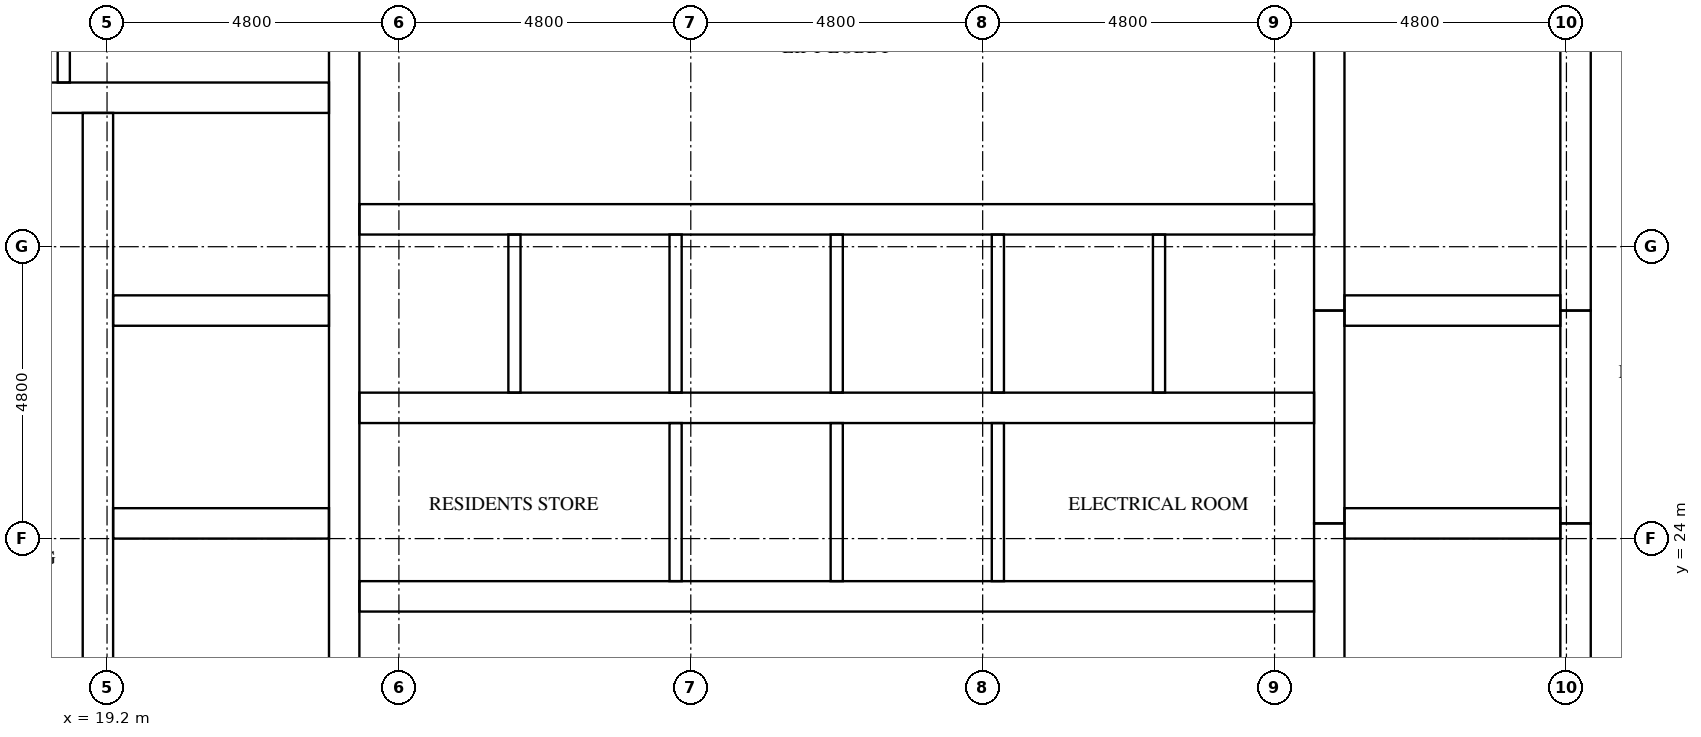
"""IFC4 building model, lengths in metres.
Left out: names, types, materials, properties, quantities, classifications, styles, units other than length and angle.
Written with IfcOpenShell. Run it as: python <this file> out.ifc"""

import sys

from ifc_helpers import new_model, si_unit, direction, frame, frame_2d, origin, place, context, subcontext, project, spatial, rectangle, extrude, element, fill, save


model = new_model("IFC4")
c1 = context("Model", 3, precision=1e-05, world=origin(), true_north=direction((0.0, 1.0)))
c2 = subcontext(c1, "Body", "Model", "MODEL_VIEW")
j1 = project(units=[si_unit("LENGTHUNIT", "METRE"), si_unit("PLANEANGLEUNIT", "RADIAN")], contexts=[c1])
p1 = place(None, origin())
s1 = spatial("IfcSite", under=j1, at=p1, CompositionType="ELEMENT")
p2 = place(p1, origin())
s2 = spatial("IfcBuilding", under=s1, at=p2, CompositionType="ELEMENT")
p3 = place(p2, frame((0.0, 0.0, 185.9)))
s3 = spatial("IfcBuildingStorey", under=s2, at=p3, CompositionType="ELEMENT", Elevation=185.9)
p4 = place(p3, frame((19.05, 15.7, 0.0), z_axis=(0.0, 0.0, 1.0), x_axis=(0.0, 1.0, 0.0)))
e1 = element("IfcWall", 1, at=p4, inside=s3, PredefinedType="SHEAR", context=c2, shape_type="SweptSolid", body=[
    extrude(rectangle(XDim=15.3, YDim=0.5, at=frame_2d((7.65, 0.0))), origin(), (0.0, 0.0, 1.0), 3.2),
])
p5 = place(p4, frame((9.75, 0.0, 0.0)))
e2 = element("IfcOpeningElement", 2, at=p5, cuts=e1, PredefinedType="OPENING", context=c2, shape_type="SweptSolid", body=[
    extrude(rectangle(XDim=1.1, YDim=2.1, at=frame_2d((0.55, 1.05))), frame((0.0, 0.26, 0.0), z_axis=(0.0, -1.0, 0.0), x_axis=(1.0, 0.0, 0.0)), (0.0, 0.0, 1.0), 0.52),
])
p6 = place(p4, frame((13.25, 0.0, 0.0)))
e3 = element("IfcOpeningElement", 3, at=p6, cuts=e1, PredefinedType="OPENING", context=c2, shape_type="SweptSolid", body=[
    extrude(rectangle(XDim=1.1, YDim=2.1, at=frame_2d((0.55, 1.05))), frame((0.0, 0.26, 0.0), z_axis=(0.0, -1.0, 0.0), x_axis=(1.0, 0.0, 0.0)), (0.0, 0.0, 1.0), 0.52),
])
p7 = place(p4, frame((0.5, 0.0, 0.0)))
e4 = element("IfcOpeningElement", 4, at=p7, cuts=e1, PredefinedType="OPENING", context=c2, shape_type="SweptSolid", body=[
    extrude(rectangle(XDim=1.2, YDim=2.1, at=frame_2d((0.6, 1.05))), frame((0.0, 0.26, 0.0), z_axis=(0.0, -1.0, 0.0), x_axis=(1.0, 0.0, 0.0)), (0.0, 0.0, 1.0), 0.52),
])
p8 = place(p3, frame((23.1, 15.7, 0.0), z_axis=(0.0, 0.0, 1.0), x_axis=(0.0, 1.0, 0.0)))
e5 = element("IfcWall", 5, at=p8, inside=s3, PredefinedType="SHEAR", context=c2, shape_type="SweptSolid", body=[
    extrude(rectangle(XDim=21.4, YDim=0.5, at=frame_2d((10.7, 0.0))), origin(), (0.0, 0.0, 1.0), 3.2),
])
p9 = place(p3, frame((39.3, 15.7, 0.0), z_axis=(0.0, 0.0, 1.0), x_axis=(0.0, 1.0, 0.0)))
e6 = element("IfcWall", 6, at=p9, inside=s3, PredefinedType="SHEAR", context=c2, shape_type="SweptSolid", body=[
    extrude(rectangle(XDim=8.55, YDim=0.5, at=frame_2d((4.275, 0.0))), origin(), (0.0, 0.0, 1.0), 3.2),
])
p10 = place(p3, frame((39.3, 24.25, 0.0), z_axis=(0.0, 0.0, 1.0), x_axis=(0.0, 1.0, 0.0)))
e7 = element("IfcWall", 7, at=p10, inside=s3, PredefinedType="SHEAR", context=c2, shape_type="SweptSolid", body=[
    extrude(rectangle(XDim=3.5, YDim=0.5, at=frame_2d((1.75, 0.0))), origin(), (0.0, 0.0, 1.0), 3.2),
])
p11 = place(p3, frame((39.3, 27.75, 0.0), z_axis=(0.0, 0.0, 1.0), x_axis=(0.0, 1.0, 0.0)))
e8 = element("IfcWall", 8, at=p11, inside=s3, PredefinedType="SHEAR", context=c2, shape_type="SweptSolid", body=[
    extrude(rectangle(XDim=9.35, YDim=0.5, at=frame_2d((4.675, 0.0))), origin(), (0.0, 0.0, 1.0), 3.2),
])
p12 = place(p3, frame((43.35, 15.7, 0.0), z_axis=(0.0, 0.0, 1.0), x_axis=(0.0, 1.0, 0.0)))
e9 = element("IfcWall", 9, at=p12, inside=s3, PredefinedType="SHEAR", context=c2, shape_type="SweptSolid", body=[
    extrude(rectangle(XDim=8.55, YDim=0.5, at=frame_2d((4.275, 0.0))), origin(), (0.0, 0.0, 1.0), 3.2),
])
p13 = place(p12, frame((0.5, 0.0, 0.0)))
e10 = element("IfcOpeningElement", 10, at=p13, cuts=e9, PredefinedType="OPENING", context=c2, shape_type="SweptSolid", body=[
    extrude(rectangle(XDim=1.2, YDim=2.1, at=frame_2d((0.6, 1.05))), frame((0.0, 0.26, 0.0), z_axis=(0.0, -1.0, 0.0), x_axis=(1.0, 0.0, 0.0)), (0.0, 0.0, 1.0), 0.52),
])
p14 = place(p3, frame((43.35, 24.25, 0.0), z_axis=(0.0, 0.0, 1.0), x_axis=(0.0, 1.0, 0.0)))
e11 = element("IfcWall", 11, at=p14, inside=s3, PredefinedType="SHEAR", context=c2, shape_type="SweptSolid", body=[
    extrude(rectangle(XDim=3.5, YDim=0.5, at=frame_2d((1.75, 0.0))), origin(), (0.0, 0.0, 1.0), 3.2),
])
p15 = place(p14, frame((1.2, 0.0, 0.0)))
e12 = element("IfcOpeningElement", 12, at=p15, cuts=e11, PredefinedType="OPENING", context=c2, shape_type="SweptSolid", body=[
    extrude(rectangle(XDim=1.1, YDim=2.1, at=frame_2d((0.55, 1.05))), frame((0.0, 0.26, 0.0), z_axis=(0.0, -1.0, 0.0), x_axis=(1.0, 0.0, 0.0)), (0.0, 0.0, 1.0), 0.52),
])
p16 = place(p3, frame((43.35, 27.75, 0.0), z_axis=(0.0, 0.0, 1.0), x_axis=(0.0, 1.0, 0.0)))
e13 = element("IfcWall", 13, at=p16, inside=s3, PredefinedType="SHEAR", context=c2, shape_type="SweptSolid", body=[
    extrude(rectangle(XDim=9.35, YDim=0.5, at=frame_2d((4.675, 0.0))), origin(), (0.0, 0.0, 1.0), 3.2),
])
p17 = place(p16, frame((7.65, 0.0, 0.0)))
e14 = element("IfcOpeningElement", 14, at=p17, cuts=e13, PredefinedType="OPENING", context=c2, shape_type="SweptSolid", body=[
    extrude(rectangle(XDim=1.2, YDim=2.1, at=frame_2d((0.6, 1.05))), frame((0.0, 0.26, 0.0), z_axis=(0.0, -1.0, 0.0), x_axis=(1.0, 0.0, 0.0)), (0.0, 0.0, 1.0), 0.52),
])
for number, where, z_axis, x_axis in (
    (15, (19.3, 24.25, 0.0), (0.0, 0.0, 1.0), (1.0, 0.0, 0.0)),
    (16, (19.3, 27.75, 0.0), (0.0, 0.0, 1.0), (1.0, 0.0, 0.0)),
):
    element("IfcWall", number, at=place(p3, frame(where, z_axis=z_axis, x_axis=x_axis)), inside=s3, PredefinedType="SHEAR", context=c2, shape_type="SweptSolid", body=[
        extrude(rectangle(XDim=3.55, YDim=0.5, at=frame_2d((1.775, 0.0))), origin(), (0.0, 0.0, 1.0), 3.2),
    ])
p18 = place(p3, frame((15.7, 31.25, 0.0), z_axis=(0.0, 0.0, 1.0), x_axis=(1.0, 0.0, 0.0)))
e17 = element("IfcWall", 17, at=p18, inside=s3, PredefinedType="SHEAR", context=c2, shape_type="SweptSolid", body=[
    extrude(rectangle(XDim=7.15, YDim=0.5, at=frame_2d((3.575, 0.0))), origin(), (0.0, 0.0, 1.0), 3.2),
])
for number, where, z_axis, x_axis in (
    (18, (39.55, 24.25, 0.0), (0.0, 0.0, 1.0), (1.0, 0.0, 0.0)),
    (19, (39.55, 27.75, 0.0), (0.0, 0.0, 1.0), (1.0, 0.0, 0.0)),
):
    element("IfcWall", number, at=place(p3, frame(where, z_axis=z_axis, x_axis=x_axis)), inside=s3, PredefinedType="SHEAR", context=c2, shape_type="SweptSolid", body=[
        extrude(rectangle(XDim=3.55, YDim=0.5, at=frame_2d((1.775, 0.0))), origin(), (0.0, 0.0, 1.0), 3.2),
    ])
p19 = place(p3, frame((23.35, 23.05, 0.0), z_axis=(0.0, 0.0, 1.0), x_axis=(1.0, 0.0, 0.0)))
e20 = element("IfcWall", 20, at=p19, inside=s3, PredefinedType="SHEAR", context=c2, shape_type="SweptSolid", body=[
    extrude(rectangle(XDim=15.7, YDim=0.5, at=frame_2d((7.85, 0.0))), origin(), (0.0, 0.0, 1.0), 3.2),
])
p20 = place(p19, frame((2.05, 0.0, 0.0)))
e21 = element("IfcOpeningElement", 21, at=p20, cuts=e20, PredefinedType="OPENING", context=c2, shape_type="SweptSolid", body=[
    extrude(rectangle(XDim=1.0, YDim=2.1, at=frame_2d((0.5, 1.05))), frame((0.0, 0.26, 0.0), z_axis=(0.0, -1.0, 0.0), x_axis=(1.0, 0.0, 0.0)), (0.0, 0.0, 1.0), 0.52),
])
p21 = place(p19, frame((12.65, 0.0, 0.0)))
e22 = element("IfcOpeningElement", 22, at=p21, cuts=e20, PredefinedType="OPENING", context=c2, shape_type="SweptSolid", body=[
    extrude(rectangle(XDim=1.0, YDim=2.1, at=frame_2d((0.5, 1.05))), frame((0.0, 0.26, 0.0), z_axis=(0.0, -1.0, 0.0), x_axis=(1.0, 0.0, 0.0)), (0.0, 0.0, 1.0), 0.52),
])
p22 = place(p3, frame((23.35, 26.15, 0.0), z_axis=(0.0, 0.0, 1.0), x_axis=(1.0, 0.0, 0.0)))
e23 = element("IfcWall", 23, at=p22, inside=s3, PredefinedType="SHEAR", context=c2, shape_type="SweptSolid", body=[
    extrude(rectangle(XDim=15.7, YDim=0.5, at=frame_2d((7.85, 0.0))), origin(), (0.0, 0.0, 1.0), 3.2),
])
p23 = place(p3, frame((23.35, 29.25, 0.0), z_axis=(0.0, 0.0, 1.0), x_axis=(1.0, 0.0, 0.0)))
e24 = element("IfcWall", 24, at=p23, inside=s3, PredefinedType="SHEAR", context=c2, shape_type="SweptSolid", body=[
    extrude(rectangle(XDim=15.7, YDim=0.5, at=frame_2d((7.85, 0.0))), origin(), (0.0, 0.0, 1.0), 3.2),
])
p24 = place(p23, frame((0.675, 0.0, 0.0)))
e25 = element("IfcOpeningElement", 25, at=p24, cuts=e24, PredefinedType="OPENING", context=c2, shape_type="SweptSolid", body=[
    extrude(rectangle(XDim=1.1, YDim=2.1, at=frame_2d((0.55, 1.05))), frame((0.0, 0.26, 0.0), z_axis=(0.0, -1.0, 0.0), x_axis=(1.0, 0.0, 0.0)), (0.0, 0.0, 1.0), 0.52),
])
p25 = place(p23, frame((3.325, 0.0, 0.0)))
e26 = element("IfcOpeningElement", 26, at=p25, cuts=e24, PredefinedType="OPENING", context=c2, shape_type="SweptSolid", body=[
    extrude(rectangle(XDim=1.1, YDim=2.1, at=frame_2d((0.55, 1.05))), frame((0.0, 0.26, 0.0), z_axis=(0.0, -1.0, 0.0), x_axis=(1.0, 0.0, 0.0)), (0.0, 0.0, 1.0), 0.52),
])
p26 = place(p23, frame((5.975, 0.0, 0.0)))
e27 = element("IfcOpeningElement", 27, at=p26, cuts=e24, PredefinedType="OPENING", context=c2, shape_type="SweptSolid", body=[
    extrude(rectangle(XDim=1.1, YDim=2.1, at=frame_2d((0.55, 1.05))), frame((0.0, 0.26, 0.0), z_axis=(0.0, -1.0, 0.0), x_axis=(1.0, 0.0, 0.0)), (0.0, 0.0, 1.0), 0.52),
])
p27 = place(p23, frame((8.625, 0.0, 0.0)))
e28 = element("IfcOpeningElement", 28, at=p27, cuts=e24, PredefinedType="OPENING", context=c2, shape_type="SweptSolid", body=[
    extrude(rectangle(XDim=1.1, YDim=2.1, at=frame_2d((0.55, 1.05))), frame((0.0, 0.26, 0.0), z_axis=(0.0, -1.0, 0.0), x_axis=(1.0, 0.0, 0.0)), (0.0, 0.0, 1.0), 0.52),
])
p28 = place(p23, frame((11.275, 0.0, 0.0)))
e29 = element("IfcOpeningElement", 29, at=p28, cuts=e24, PredefinedType="OPENING", context=c2, shape_type="SweptSolid", body=[
    extrude(rectangle(XDim=1.1, YDim=2.1, at=frame_2d((0.55, 1.05))), frame((0.0, 0.26, 0.0), z_axis=(0.0, -1.0, 0.0), x_axis=(1.0, 0.0, 0.0)), (0.0, 0.0, 1.0), 0.52),
])
p29 = place(p23, frame((13.925, 0.0, 0.0)))
e30 = element("IfcOpeningElement", 30, at=p29, cuts=e24, PredefinedType="OPENING", context=c2, shape_type="SweptSolid", body=[
    extrude(rectangle(XDim=1.1, YDim=2.1, at=frame_2d((0.55, 1.05))), frame((0.0, 0.26, 0.0), z_axis=(0.0, -1.0, 0.0), x_axis=(1.0, 0.0, 0.0)), (0.0, 0.0, 1.0), 0.52),
])
p30 = place(p3, frame((25.9, 26.4, 0.0), z_axis=(0.0, 0.0, 1.0), x_axis=(0.0, 1.0, 0.0)))
e31 = element("IfcWall", 31, at=p30, inside=s3, PredefinedType="SOLIDWALL", context=c2, shape_type="SweptSolid", body=[
    extrude(rectangle(XDim=2.6, YDim=0.2, at=frame_2d((1.3, 0.0))), origin(), (0.0, 0.0, 1.0), 3.2),
])
p31 = place(p3, frame((28.55, 23.3, 0.0), z_axis=(0.0, 0.0, 1.0), x_axis=(0.0, 1.0, 0.0)))
e32 = element("IfcWall", 32, at=p31, inside=s3, PredefinedType="SOLIDWALL", context=c2, shape_type="SweptSolid", body=[
    extrude(rectangle(XDim=2.6, YDim=0.2, at=frame_2d((1.3, 0.0))), origin(), (0.0, 0.0, 1.0), 3.2),
])
p32 = place(p3, frame((28.55, 26.4, 0.0), z_axis=(0.0, 0.0, 1.0), x_axis=(0.0, 1.0, 0.0)))
e33 = element("IfcWall", 33, at=p32, inside=s3, PredefinedType="SOLIDWALL", context=c2, shape_type="SweptSolid", body=[
    extrude(rectangle(XDim=2.6, YDim=0.2, at=frame_2d((1.3, 0.0))), origin(), (0.0, 0.0, 1.0), 3.2),
])
p33 = place(p3, frame((31.2, 23.3, 0.0), z_axis=(0.0, 0.0, 1.0), x_axis=(0.0, 1.0, 0.0)))
e34 = element("IfcWall", 34, at=p33, inside=s3, PredefinedType="SOLIDWALL", context=c2, shape_type="SweptSolid", body=[
    extrude(rectangle(XDim=2.6, YDim=0.2, at=frame_2d((1.3, 0.0))), origin(), (0.0, 0.0, 1.0), 3.2),
])
p34 = place(p3, frame((31.2, 26.4, 0.0), z_axis=(0.0, 0.0, 1.0), x_axis=(0.0, 1.0, 0.0)))
e35 = element("IfcWall", 35, at=p34, inside=s3, PredefinedType="SOLIDWALL", context=c2, shape_type="SweptSolid", body=[
    extrude(rectangle(XDim=2.6, YDim=0.2, at=frame_2d((1.3, 0.0))), origin(), (0.0, 0.0, 1.0), 3.2),
])
p35 = place(p3, frame((33.85, 23.3, 0.0), z_axis=(0.0, 0.0, 1.0), x_axis=(0.0, 1.0, 0.0)))
e36 = element("IfcWall", 36, at=p35, inside=s3, PredefinedType="SOLIDWALL", context=c2, shape_type="SweptSolid", body=[
    extrude(rectangle(XDim=2.6, YDim=0.2, at=frame_2d((1.3, 0.0))), origin(), (0.0, 0.0, 1.0), 3.2),
])
for number, where, z_axis, x_axis in (
    (37, (33.85, 26.4, 0.0), (0.0, 0.0, 1.0), (0.0, 1.0, 0.0)),
    (38, (36.5, 26.4, 0.0), (0.0, 0.0, 1.0), (0.0, 1.0, 0.0)),
):
    element("IfcWall", number, at=place(p3, frame(where, z_axis=z_axis, x_axis=x_axis)), inside=s3, PredefinedType="SOLIDWALL", context=c2, shape_type="SweptSolid", body=[
        extrude(rectangle(XDim=2.6, YDim=0.2, at=frame_2d((1.3, 0.0))), origin(), (0.0, 0.0, 1.0), 3.2),
    ])
p36 = place(p3, frame((18.489, 31.5, 0.0), z_axis=(0.0, 0.0, 1.0), x_axis=(0.0, 1.0, 0.0)))
e39 = element("IfcWall", 39, at=p36, inside=s3, PredefinedType="PARTITIONING", context=c2, shape_type="SweptSolid", body=[
    extrude(rectangle(XDim=5.6, YDim=0.2, at=frame_2d((2.8, 0.0))), origin(), (0.0, 0.0, 1.0), 3.2),
])
p37 = place(p24, origin())
e40 = element("IfcDoor", 40, at=p37, inside=s3, OperationType="DOUBLE_DOOR_SLIDING", PredefinedType="DOOR", context=c2, shape_type="SweptSolid", body=[
    extrude(rectangle(XDim=1.1, YDim=2.1, at=frame_2d((0.55, 1.05))), frame((0.0, 0.025, 0.0), z_axis=(0.0, -1.0, 0.0), x_axis=(1.0, 0.0, 0.0)), (0.0, 0.0, 1.0), 0.05),
])
fill(e25, e40)
p38 = place(p25, origin())
e41 = element("IfcDoor", 41, at=p38, inside=s3, OperationType="DOUBLE_DOOR_SLIDING", PredefinedType="DOOR", context=c2, shape_type="SweptSolid", body=[
    extrude(rectangle(XDim=1.1, YDim=2.1, at=frame_2d((0.55, 1.05))), frame((0.0, 0.025, 0.0), z_axis=(0.0, -1.0, 0.0), x_axis=(1.0, 0.0, 0.0)), (0.0, 0.0, 1.0), 0.05),
])
fill(e26, e41)
p39 = place(p26, origin())
e42 = element("IfcDoor", 42, at=p39, inside=s3, OperationType="DOUBLE_DOOR_SLIDING", PredefinedType="DOOR", context=c2, shape_type="SweptSolid", body=[
    extrude(rectangle(XDim=1.1, YDim=2.1, at=frame_2d((0.55, 1.05))), frame((0.0, 0.025, 0.0), z_axis=(0.0, -1.0, 0.0), x_axis=(1.0, 0.0, 0.0)), (0.0, 0.0, 1.0), 0.05),
])
fill(e27, e42)
p40 = place(p27, origin())
e43 = element("IfcDoor", 43, at=p40, inside=s3, OperationType="DOUBLE_DOOR_SLIDING", PredefinedType="DOOR", context=c2, shape_type="SweptSolid", body=[
    extrude(rectangle(XDim=1.1, YDim=2.1, at=frame_2d((0.55, 1.05))), frame((0.0, 0.025, 0.0), z_axis=(0.0, -1.0, 0.0), x_axis=(1.0, 0.0, 0.0)), (0.0, 0.0, 1.0), 0.05),
])
fill(e28, e43)
p41 = place(p28, origin())
e44 = element("IfcDoor", 44, at=p41, inside=s3, OperationType="DOUBLE_DOOR_SLIDING", PredefinedType="DOOR", context=c2, shape_type="SweptSolid", body=[
    extrude(rectangle(XDim=1.1, YDim=2.1, at=frame_2d((0.55, 1.05))), frame((0.0, 0.025, 0.0), z_axis=(0.0, -1.0, 0.0), x_axis=(1.0, 0.0, 0.0)), (0.0, 0.0, 1.0), 0.05),
])
fill(e29, e44)
p42 = place(p29, origin())
e45 = element("IfcDoor", 45, at=p42, inside=s3, OperationType="DOUBLE_DOOR_SLIDING", PredefinedType="DOOR", context=c2, shape_type="SweptSolid", body=[
    extrude(rectangle(XDim=1.1, YDim=2.1, at=frame_2d((0.55, 1.05))), frame((0.0, 0.025, 0.0), z_axis=(0.0, -1.0, 0.0), x_axis=(1.0, 0.0, 0.0)), (0.0, 0.0, 1.0), 0.05),
])
fill(e30, e45)
p43 = place(p5, origin())
e46 = element("IfcDoor", 46, at=p43, inside=s3, OperationType="DOUBLE_DOOR_SLIDING", PredefinedType="DOOR", context=c2, shape_type="SweptSolid", body=[
    extrude(rectangle(XDim=1.1, YDim=2.1, at=frame_2d((0.55, 1.05))), frame((0.0, 0.025, 0.0), z_axis=(0.0, -1.0, 0.0), x_axis=(1.0, 0.0, 0.0)), (0.0, 0.0, 1.0), 0.05),
])
fill(e2, e46)
p44 = place(p6, origin())
e47 = element("IfcDoor", 47, at=p44, inside=s3, OperationType="DOUBLE_DOOR_SLIDING", PredefinedType="DOOR", context=c2, shape_type="SweptSolid", body=[
    extrude(rectangle(XDim=1.1, YDim=2.1, at=frame_2d((0.55, 1.05))), frame((0.0, 0.025, 0.0), z_axis=(0.0, -1.0, 0.0), x_axis=(1.0, 0.0, 0.0)), (0.0, 0.0, 1.0), 0.05),
])
fill(e3, e47)
p45 = place(p15, origin())
e48 = element("IfcDoor", 48, at=p45, inside=s3, OperationType="DOUBLE_DOOR_SLIDING", PredefinedType="DOOR", context=c2, shape_type="SweptSolid", body=[
    extrude(rectangle(XDim=1.1, YDim=2.1, at=frame_2d((0.55, 1.05))), frame((0.0, 0.025, 0.0), z_axis=(0.0, -1.0, 0.0), x_axis=(1.0, 0.0, 0.0)), (0.0, 0.0, 1.0), 0.05),
])
fill(e12, e48)
p46 = place(p20, frame((1.0, 0.0, 0.0), z_axis=(0.0, 0.0, 1.0), x_axis=(-1.0, 0.0, 0.0)))
e49 = element("IfcDoor", 49, at=p46, inside=s3, OperationType="SINGLE_SWING_LEFT", PredefinedType="DOOR", context=c2, shape_type="SweptSolid", body=[
    extrude(rectangle(XDim=1.0, YDim=2.1, at=frame_2d((0.5, 1.05))), frame((0.0, 0.025, 0.0), z_axis=(0.0, -1.0, 0.0), x_axis=(1.0, 0.0, 0.0)), (0.0, 0.0, 1.0), 0.05),
])
fill(e21, e49)
p47 = place(p21, frame((1.0, 0.0, 0.0), z_axis=(0.0, 0.0, 1.0), x_axis=(-1.0, 0.0, 0.0)))
e50 = element("IfcDoor", 50, at=p47, inside=s3, OperationType="SINGLE_SWING_RIGHT", PredefinedType="DOOR", context=c2, shape_type="SweptSolid", body=[
    extrude(rectangle(XDim=1.0, YDim=2.1, at=frame_2d((0.5, 1.05))), frame((0.0, 0.025, 0.0), z_axis=(0.0, -1.0, 0.0), x_axis=(1.0, 0.0, 0.0)), (0.0, 0.0, 1.0), 0.05),
])
fill(e22, e50)
save(model, sys.argv[1])
